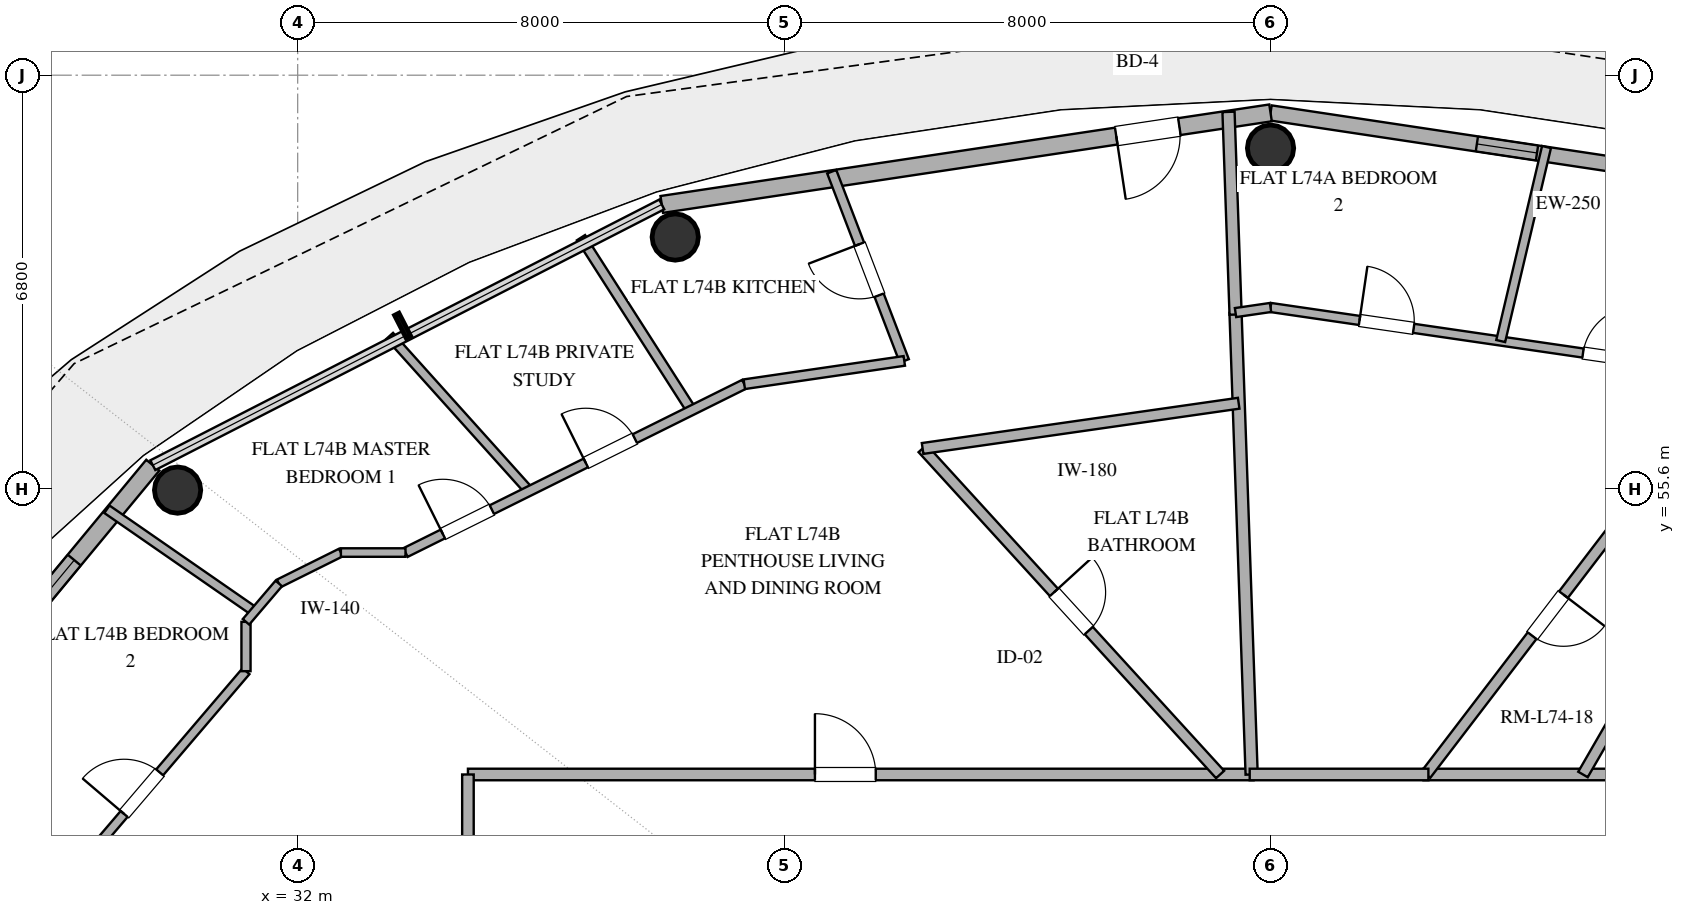
"""IFC4 building model, lengths in metres.
Left out: names, types, materials, properties, quantities, classifications, styles, units other than length and angle.
Written with IfcOpenShell. Run it as: python <this file> out.ifc"""

import sys

from ifc_helpers import new_model, si_unit, direction, frame, frame_2d, origin, origin_2d, place, context, subcontext, project, spatial, rectangle, hollow_circle, extrude, element, fill, save


model = new_model("IFC4")
c1 = context("Model", 3, precision=1e-05, world=origin(), true_north=direction((0.0, 1.0)))
c2 = subcontext(c1, "Body", "Model", "MODEL_VIEW")
j1 = project(units=[si_unit("LENGTHUNIT", "METRE"), si_unit("PLANEANGLEUNIT", "RADIAN")], contexts=[c1])
p1 = place(None, origin())
s1 = spatial("IfcSite", under=j1, at=p1, CompositionType="ELEMENT")
p2 = place(p1, origin())
s2 = spatial("IfcBuilding", under=s1, at=p2, CompositionType="ELEMENT")
p3 = place(p2, frame((0.0, 0.0, 287.4)))
s3 = spatial("IfcBuildingStorey", under=s2, at=p3, CompositionType="ELEMENT", Elevation=287.4)
for number, where, z_axis, x_axis in (
    (1, (48.0, 61.2, 0.0), (0.0, 0.0, 1.0), (1.0, 0.0, 0.0)),
    (2, (38.209, 59.739, 0.0), (0.0, 0.0, 1.0), (1.0, 0.0, 0.0)),
    (3, (30.025, 55.576, 0.0), (0.0, 0.0, 1.0), (1.0, 0.0, 0.0)),
):
    element("IfcColumn", number, at=place(p3, frame(where, z_axis=z_axis, x_axis=x_axis)), inside=s3, PredefinedType="COLUMN", context=c2, shape_type="SweptSolid", body=[
        extrude(hollow_circle(Radius=0.381, WallThickness=0.025, at=origin_2d()), origin(), (0.0, 0.0, 1.0), 3.37),
    ])
p4 = place(p3, frame((58.013, 60.274, 0.0), z_axis=(0.0, 0.0, 1.0), x_axis=(-0.988882522213, 0.148698881169, 0.0)))
e4 = element("IfcWall", 4, at=p4, inside=s3, PredefinedType="SOLIDWALL", context=c2, shape_type="SweptSolid", body=[
    extrude(rectangle(XDim=10.125, YDim=0.25, at=frame_2d((5.062, 0.0))), origin(), (0.0, 0.0, 1.0), 3.37),
])
p5 = place(p4, frame((2.134, 0.0, 1.42)))
e5 = element("IfcOpeningElement", 5, at=p5, cuts=e4, PredefinedType="OPENING", context=c2, shape_type="SweptSolid", body=[
    extrude(rectangle(XDim=1.0, YDim=1.05, at=frame_2d((0.5, 0.525))), frame((0.0, 0.135, 0.0), z_axis=(0.0, -1.0, 0.0), x_axis=(1.0, 0.0, 0.0)), (0.0, 0.0, 1.0), 0.27),
])
p6 = place(p4, frame((5.694, 0.0, 0.35)))
e6 = element("IfcOpeningElement", 6, at=p6, cuts=e4, PredefinedType="OPENING", context=c2, shape_type="SweptSolid", body=[
    extrude(rectangle(XDim=1.0, YDim=1.05, at=frame_2d((0.5, 0.525))), frame((0.0, 0.135, 0.0), z_axis=(0.0, -1.0, 0.0), x_axis=(1.0, 0.0, 0.0)), (0.0, 0.0, 1.0), 0.27),
])
p7 = place(p3, frame((48.0, 61.78, 0.0), z_axis=(0.0, 0.0, 1.0), x_axis=(-0.988882522213, -0.148698881169, 0.0)))
e7 = element("IfcWall", 7, at=p7, inside=s3, PredefinedType="SOLIDWALL", context=c2, shape_type="SweptSolid", body=[
    extrude(rectangle(XDim=10.125, YDim=0.28, at=frame_2d((5.062, 0.0))), origin(), (0.0, 0.0, 1.0), 3.37),
])
p8 = place(p7, frame((1.516, 0.0, 0.0)))
e8 = element("IfcOpeningElement", 8, at=p8, cuts=e7, PredefinedType="OPENING", context=c2, shape_type="SweptSolid", body=[
    extrude(rectangle(XDim=1.05, YDim=2.2, at=frame_2d((0.525, 1.1))), frame((0.0, 0.15, 0.0), z_axis=(0.0, -1.0, 0.0), x_axis=(1.0, 0.0, 0.0)), (0.0, 0.0, 1.0), 0.3),
])
p9 = place(p3, frame((29.617, 55.987, 0.0), z_axis=(0.0, 0.0, 1.0), x_axis=(-0.63761509934, -0.770355103243, 0.0)))
e9 = element("IfcWall", 9, at=p9, inside=s3, PredefinedType="SOLIDWALL", context=c2, shape_type="SweptSolid", body=[
    extrude(rectangle(XDim=8.33, YDim=0.28, at=frame_2d((4.165, 0.0))), origin(), (0.0, 0.0, 1.0), 3.37),
])
p10 = place(p9, frame((2.026, 0.0, 0.85)))
e10 = element("IfcOpeningElement", 10, at=p10, cuts=e9, PredefinedType="OPENING", context=c2, shape_type="SweptSolid", body=[
    extrude(rectangle(XDim=1.8, YDim=2.2, at=frame_2d((0.9, 1.1))), frame((0.0, 0.15, 0.0), z_axis=(0.0, -1.0, 0.0), x_axis=(1.0, 0.0, 0.0)), (0.0, 0.0, 1.0), 0.3),
])
p11 = place(p9, frame((4.396, 0.0, 0.85)))
e11 = element("IfcOpeningElement", 11, at=p11, cuts=e9, PredefinedType="OPENING", context=c2, shape_type="SweptSolid", body=[
    extrude(rectangle(XDim=1.8, YDim=2.2, at=frame_2d((0.9, 1.1))), frame((0.0, 0.15, 0.0), z_axis=(0.0, -1.0, 0.0), x_axis=(1.0, 0.0, 0.0)), (0.0, 0.0, 1.0), 0.3),
])
p12 = place(p3, frame((34.8, 50.9, 0.0), z_axis=(0.0, 0.0, 1.0), x_axis=(1.0, 0.0, 0.0)))
e12 = element("IfcWall", 12, at=p12, inside=s3, PredefinedType="PARTITIONING", context=c2, shape_type="SweptSolid", body=[
    extrude(rectangle(XDim=12.921, YDim=0.19, at=frame_2d((6.46, 0.0))), origin(), (0.0, 0.0, 1.0), 2.73),
])
p13 = place(p12, frame((5.707, 0.0, 0.0)))
e13 = element("IfcOpeningElement", 13, at=p13, cuts=e12, PredefinedType="OPENING", context=c2, shape_type="SweptSolid", body=[
    extrude(rectangle(XDim=1.0, YDim=2.2, at=frame_2d((0.5, 1.1))), frame((0.0, 0.105, 0.0), z_axis=(0.0, -1.0, 0.0), x_axis=(1.0, 0.0, 0.0)), (0.0, 0.0, 1.0), 0.21),
])
p14 = place(p3, frame((34.8, 34.0, 0.0), z_axis=(0.0, 0.0, 1.0), x_axis=(0.0, 1.0, 0.0)))
e14 = element("IfcWall", 14, at=p14, inside=s3, PredefinedType="PARTITIONING", context=c2, shape_type="SweptSolid", body=[
    extrude(rectangle(XDim=16.9, YDim=0.19, at=frame_2d((8.45, 0.0))), origin(), (0.0, 0.0, 1.0), 2.73),
])
p15 = place(p14, frame((7.627, 0.0, 0.0)))
e15 = element("IfcOpeningElement", 15, at=p15, cuts=e14, PredefinedType="OPENING", context=c2, shape_type="SweptSolid", body=[
    extrude(rectangle(XDim=1.0, YDim=2.2, at=frame_2d((0.5, 1.1))), frame((0.0, 0.105, 0.0), z_axis=(0.0, -1.0, 0.0), x_axis=(1.0, 0.0, 0.0)), (0.0, 0.0, 1.0), 0.21),
])
p16 = place(p3, frame((50.515, 50.9, 0.0), z_axis=(0.0, 0.0, 1.0), x_axis=(1.0, 0.0, 0.0)))
e16 = element("IfcWall", 16, at=p16, inside=s3, PredefinedType="PARTITIONING", context=c2, shape_type="SweptSolid", body=[
    extrude(rectangle(XDim=10.685, YDim=0.19, at=frame_2d((5.342, 0.0))), origin(), (0.0, 0.0, 1.0), 2.73),
])
p17 = place(p16, frame((6.135, 0.0, 0.0)))
e17 = element("IfcOpeningElement", 17, at=p17, cuts=e16, PredefinedType="OPENING", context=c2, shape_type="SweptSolid", body=[
    extrude(rectangle(XDim=1.0, YDim=2.2, at=frame_2d((0.5, 1.1))), frame((0.0, 0.105, 0.0), z_axis=(0.0, -1.0, 0.0), x_axis=(1.0, 0.0, 0.0)), (0.0, 0.0, 1.0), 0.21),
])
p18 = place(p3, frame((42.278, 56.261, 0.0), z_axis=(0.0, 0.0, 1.0), x_axis=(0.674096276867, -0.73864349284, 0.0)))
e18 = element("IfcWall", 18, at=p18, inside=s3, PredefinedType="PLUMBINGWALL", context=c2, shape_type="SweptSolid", body=[
    extrude(rectangle(XDim=7.258, YDim=0.18, at=frame_2d((3.629, 0.0))), origin(), (0.0, 0.0, 1.0), 2.73),
])
p19 = place(p18, frame((3.204, 0.0, 0.0)))
e19 = element("IfcOpeningElement", 19, at=p19, cuts=e18, PredefinedType="OPENING", context=c2, shape_type="SweptSolid", body=[
    extrude(rectangle(XDim=0.85, YDim=2.1, at=frame_2d((0.425, 1.05))), frame((0.0, 0.1, 0.0), z_axis=(0.0, -1.0, 0.0), x_axis=(1.0, 0.0, 0.0)), (0.0, 0.0, 1.0), 0.2),
])
p20 = place(p3, frame((54.564, 56.141, 0.0), z_axis=(0.0, 0.0, 1.0), x_axis=(-0.607456974677, -0.794352581614, 0.0)))
e20 = element("IfcWall", 20, at=p20, inside=s3, PredefinedType="PLUMBINGWALL", context=c2, shape_type="SweptSolid", body=[
    extrude(rectangle(XDim=6.598, YDim=0.18, at=frame_2d((3.299, 0.0))), origin(), (0.0, 0.0, 1.0), 2.73),
])
p21 = place(p20, frame((2.874, 0.0, 0.0)))
e21 = element("IfcOpeningElement", 21, at=p21, cuts=e20, PredefinedType="OPENING", context=c2, shape_type="SweptSolid", body=[
    extrude(rectangle(XDim=0.85, YDim=2.1, at=frame_2d((0.425, 1.05))), frame((0.0, 0.1, 0.0), z_axis=(0.0, -1.0, 0.0), x_axis=(1.0, 0.0, 0.0)), (0.0, 0.0, 1.0), 0.2),
])
p22 = place(p3, frame((47.689, 50.9, 0.0), z_axis=(0.0, 0.0, 1.0), x_axis=(-0.034882659784, 0.999391414835, 0.0)))
e22 = element("IfcWall", 22, at=p22, inside=s3, PredefinedType="PARTITIONING", context=c2, shape_type="SweptSolid", body=[
    extrude(rectangle(XDim=7.601, YDim=0.2, at=frame_2d((3.8, 0.0))), origin(), (0.0, 0.0, 1.0), 2.73),
])
p23 = place(p3, frame((53.138, 50.9, 0.0), z_axis=(0.0, 0.0, 1.0), x_axis=(0.499985927882, 0.866033528173, 0.0)))
e23 = element("IfcWall", 23, at=p23, inside=s3, PredefinedType="PLUMBINGWALL", context=c2, shape_type="SweptSolid", body=[
    extrude(rectangle(XDim=5.802, YDim=0.18, at=frame_2d((2.901, 0.0))), origin(), (0.0, 0.0, 1.0), 2.73),
])
p24 = place(p3, frame((27.726, 48.587, 0.0), z_axis=(0.0, 0.0, 1.0), x_axis=(0.649196412447, 0.760620810961, 0.0)))
e24 = element("IfcWall", 24, at=p24, inside=s3, PredefinedType="PARTITIONING", context=c2, shape_type="SweptSolid", body=[
    extrude(rectangle(XDim=5.274, YDim=0.15, at=frame_2d((2.637, 0.0))), origin(), (0.0, 0.0, 1.0), 2.73),
])
p25 = place(p24, frame((2.187, 0.0, 0.0)))
e25 = element("IfcOpeningElement", 25, at=p25, cuts=e24, PredefinedType="OPENING", context=c2, shape_type="SweptSolid", body=[
    extrude(rectangle(XDim=0.9, YDim=2.1, at=frame_2d((0.45, 1.05))), frame((0.0, 0.085, 0.0), z_axis=(0.0, -1.0, 0.0), x_axis=(1.0, 0.0, 0.0)), (0.0, 0.0, 1.0), 0.17),
])
p26 = place(p3, frame((47.476, 57.005, 0.0), z_axis=(0.0, 0.0, 1.0), x_axis=(-0.989922511169, -0.141610105153, 0.0)))
e26 = element("IfcWall", 26, at=p26, inside=s3, PredefinedType="PLUMBINGWALL", context=c2, shape_type="SweptSolid", body=[
    extrude(rectangle(XDim=5.251, YDim=0.18, at=frame_2d((2.626, 0.0))), origin(), (0.0, 0.0, 1.0), 2.73),
])
p27 = place(p3, frame((48.0, 58.58, 0.0), z_axis=(0.0, 0.0, 1.0), x_axis=(0.989536136377, -0.144285254977, 0.0)))
e27 = element("IfcWall", 27, at=p27, inside=s3, PredefinedType="PARTITIONING", context=c2, shape_type="SweptSolid", body=[
    extrude(rectangle(XDim=8.746, YDim=0.15, at=frame_2d((4.373, 0.0))), origin(), (0.0, 0.0, 1.0), 2.73),
])
p28 = place(p27, frame((1.479, 0.0, 0.0)))
e28 = element("IfcOpeningElement", 28, at=p28, cuts=e27, PredefinedType="OPENING", context=c2, shape_type="SweptSolid", body=[
    extrude(rectangle(XDim=0.9, YDim=2.1, at=frame_2d((0.45, 1.05))), frame((0.0, 0.085, 0.0), z_axis=(0.0, -1.0, 0.0), x_axis=(1.0, 0.0, 0.0)), (0.0, 0.0, 1.0), 0.17),
])
p29 = place(p27, frame((5.193, 0.0, 0.0)))
e29 = element("IfcOpeningElement", 29, at=p29, cuts=e27, PredefinedType="OPENING", context=c2, shape_type="SweptSolid", body=[
    extrude(rectangle(XDim=0.9, YDim=2.1, at=frame_2d((0.45, 1.05))), frame((0.0, 0.085, 0.0), z_axis=(0.0, -1.0, 0.0), x_axis=(1.0, 0.0, 0.0)), (0.0, 0.0, 1.0), 0.17),
])
p30 = place(p3, frame((35.807, 55.561, 0.0), z_axis=(0.0, 0.0, 1.0), x_axis=(-0.668618761853, 0.743605373365, 0.0)))
e30 = element("IfcWall", 30, at=p30, inside=s3, PredefinedType="PARTITIONING", context=c2, shape_type="SweptSolid", body=[
    extrude(rectangle(XDim=3.432, YDim=0.15, at=frame_2d((1.716, 0.0))), origin(), (0.0, 0.0, 1.0), 2.73),
])
p31 = place(p3, frame((38.477, 56.887, 0.0), z_axis=(0.0, 0.0, 1.0), x_axis=(-0.538850350107, 0.842401507709, 0.0)))
e31 = element("IfcWall", 31, at=p31, inside=s3, PredefinedType="PLUMBINGWALL", context=c2, shape_type="SweptSolid", body=[
    extrude(rectangle(XDim=3.373, YDim=0.16, at=frame_2d((1.687, 0.0))), origin(), (0.0, 0.0, 1.0), 2.73),
])
p32 = place(p3, frame((47.309, 61.797, 0.0), z_axis=(0.0, 0.0, 1.0), x_axis=(0.034921182562, -0.999390069497, 0.0)))
e32 = element("IfcWall", 32, at=p32, inside=s3, PredefinedType="PARTITIONING", context=c2, shape_type="SweptSolid", body=[
    extrude(rectangle(XDim=3.335, YDim=0.2, at=frame_2d((1.667, 0.0))), origin(), (0.0, 0.0, 1.0), 2.73),
])
p33 = place(p3, frame((41.977, 57.702, 0.0), z_axis=(0.0, 0.0, 1.0), x_axis=(-0.358154229758, 0.933662437772, 0.0)))
e33 = element("IfcWall", 33, at=p33, inside=s3, PredefinedType="PLUMBINGWALL", context=c2, shape_type="SweptSolid", body=[
    extrude(rectangle(XDim=3.333, YDim=0.16, at=frame_2d((1.667, 0.0))), origin(), (0.0, 0.0, 1.0), 2.73),
])
p34 = place(p33, frame((1.156, 0.0, 0.0)))
e34 = element("IfcOpeningElement", 34, at=p34, cuts=e33, PredefinedType="OPENING", context=c2, shape_type="SweptSolid", body=[
    extrude(rectangle(XDim=0.9, YDim=2.1, at=frame_2d((0.45, 1.05))), frame((0.0, 0.09, 0.0), z_axis=(0.0, -1.0, 0.0), x_axis=(1.0, 0.0, 0.0)), (0.0, 0.0, 1.0), 0.18),
])
p35 = place(p3, frame((51.785, 58.028, 0.0), z_axis=(0.0, 0.0, 1.0), x_axis=(0.2298279545, 0.973231273301, 0.0)))
e35 = element("IfcWall", 35, at=p35, inside=s3, PredefinedType="PARTITIONING", context=c2, shape_type="SweptSolid", body=[
    extrude(rectangle(XDim=3.278, YDim=0.15, at=frame_2d((1.639, 0.0))), origin(), (0.0, 0.0, 1.0), 2.73),
])
p36 = place(p3, frame((33.773, 54.55, 0.0), z_axis=(0.0, 0.0, 1.0), x_axis=(0.895562239868, 0.444936258943, 0.0)))
e36 = element("IfcWall", 36, at=p36, inside=s3, PredefinedType="PLUMBINGWALL", context=c2, shape_type="SweptSolid", body=[
    extrude(rectangle(XDim=6.222, YDim=0.16, at=frame_2d((3.111, 0.0))), origin(), (0.0, 0.0, 1.0), 2.73),
])
p37 = place(p36, frame((3.311, 0.0, 0.0)))
e37 = element("IfcOpeningElement", 37, at=p37, cuts=e36, PredefinedType="OPENING", context=c2, shape_type="SweptSolid", body=[
    extrude(rectangle(XDim=0.9, YDim=2.1, at=frame_2d((0.45, 1.05))), frame((0.0, 0.09, 0.0), z_axis=(0.0, -1.0, 0.0), x_axis=(1.0, 0.0, 0.0)), (0.0, 0.0, 1.0), 0.18),
])
p38 = place(p36, frame((0.686, 0.0, 0.0)))
e38 = element("IfcOpeningElement", 38, at=p38, cuts=e36, PredefinedType="OPENING", context=c2, shape_type="SweptSolid", body=[
    extrude(rectangle(XDim=0.9, YDim=2.1, at=frame_2d((0.45, 1.05))), frame((0.0, 0.09, 0.0), z_axis=(0.0, -1.0, 0.0), x_axis=(1.0, 0.0, 0.0)), (0.0, 0.0, 1.0), 0.18),
])
p39 = place(p3, frame((31.293, 53.578, 0.0), z_axis=(0.0, 0.0, 1.0), x_axis=(-0.821957300328, 0.569549116792, 0.0)))
e39 = element("IfcWall", 39, at=p39, inside=s3, PredefinedType="PARTITIONING", context=c2, shape_type="SweptSolid", body=[
    extrude(rectangle(XDim=2.957, YDim=0.15, at=frame_2d((1.479, 0.0))), origin(), (0.0, 0.0, 1.0), 2.73),
])
p40 = place(p3, frame((47.657, 50.9, 0.0), z_axis=(0.0, 0.0, 1.0), x_axis=(1.0, 0.0, 0.0)))
e40 = element("IfcWall", 40, at=p40, inside=s3, PredefinedType="PARTITIONING", context=c2, shape_type="SweptSolid", body=[
    extrude(rectangle(XDim=2.939, YDim=0.19, at=frame_2d((1.469, 0.0))), origin(), (0.0, 0.0, 1.0), 2.73),
])
p41 = place(p3, frame((39.345, 57.318, 0.0), z_axis=(0.0, 0.0, 1.0), x_axis=(0.989530249601, 0.144325621857, 0.0)))
e41 = element("IfcWall", 41, at=p41, inside=s3, PredefinedType="PLUMBINGWALL", context=c2, shape_type="SweptSolid", body=[
    extrude(rectangle(XDim=2.659, YDim=0.16, at=frame_2d((1.33, 0.0))), origin(), (0.0, 0.0, 1.0), 2.73),
])
p42 = place(p3, frame((32.711, 54.55, 0.0), z_axis=(0.0, 0.0, 1.0), x_axis=(-0.895409226325, -0.445244109912, 0.0)))
e42 = element("IfcWall", 42, at=p42, inside=s3, PredefinedType="PARTITIONING", context=c2, shape_type="SweptSolid", body=[
    extrude(rectangle(XDim=1.141, YDim=0.14, at=frame_2d((0.571, 0.0))), origin(), (0.0, 0.0, 1.0), 2.73),
])
p43 = place(p3, frame((33.773, 54.55, 0.0), z_axis=(0.0, 0.0, 1.0), x_axis=(-1.0, 0.0, 0.0)))
e43 = element("IfcWall", 43, at=p43, inside=s3, PredefinedType="PARTITIONING", context=c2, shape_type="SweptSolid", body=[
    extrude(rectangle(XDim=1.062, YDim=0.14, at=frame_2d((0.531, 0.0))), origin(), (0.0, 0.0, 1.0), 2.73),
])
p44 = place(p3, frame((31.15, 52.599, 0.0), z_axis=(0.0, 0.0, 1.0), x_axis=(0.0, 1.0, 0.0)))
e44 = element("IfcWall", 44, at=p44, inside=s3, PredefinedType="PARTITIONING", context=c2, shape_type="SweptSolid", body=[
    extrude(rectangle(XDim=0.812, YDim=0.15, at=frame_2d((0.406, 0.0))), origin(), (0.0, 0.0, 1.0), 2.73),
])
p45 = place(p3, frame((31.689, 54.042, 0.0), z_axis=(0.0, 0.0, 1.0), x_axis=(-0.649191857323, -0.760624698774, 0.0)))
e45 = element("IfcWall", 45, at=p45, inside=s3, PredefinedType="PARTITIONING", context=c2, shape_type="SweptSolid", body=[
    extrude(rectangle(XDim=0.83, YDim=0.14, at=frame_2d((0.415, 0.0))), origin(), (0.0, 0.0, 1.0), 2.73),
])
p46 = place(p3, frame((47.424, 58.496, 0.0), z_axis=(0.0, 0.0, 1.0), x_axis=(0.989534228924, 0.144298336053, 0.0)))
e46 = element("IfcWall", 46, at=p46, inside=s3, PredefinedType="PARTITIONING", context=c2, shape_type="SweptSolid", body=[
    extrude(rectangle(XDim=0.582, YDim=0.15, at=frame_2d((0.291, 0.0))), origin(), (0.0, 0.0, 1.0), 2.73),
])
p47 = place(p8, origin())
e47 = element("IfcDoor", 47, at=p47, inside=s3, OperationType="SINGLE_SWING_RIGHT", PredefinedType="DOOR", context=c2, shape_type="SweptSolid", body=[
    extrude(rectangle(XDim=1.05, YDim=2.2, at=frame_2d((0.525, 1.1))), frame((0.0, 0.025, 0.0), z_axis=(0.0, -1.0, 0.0), x_axis=(1.0, 0.0, 0.0)), (0.0, 0.0, 1.0), 0.05),
])
fill(e8, e47)
p48 = place(p10, origin())
e48 = element("IfcWindow", 48, at=p48, inside=s3, PartitioningType="SINGLE_PANEL", PredefinedType="WINDOW", context=c2, shape_type="SweptSolid", body=[
    extrude(rectangle(XDim=1.8, YDim=2.2, at=frame_2d((0.9, 1.1))), frame((0.0, 0.03, 0.0), z_axis=(0.0, -1.0, 0.0), x_axis=(1.0, 0.0, 0.0)), (0.0, 0.0, 1.0), 0.06),
])
fill(e10, e48)
p49 = place(p6, origin())
e49 = element("IfcWindow", 49, at=p49, inside=s3, PartitioningType="SINGLE_PANEL", PredefinedType="WINDOW", context=c2, shape_type="SweptSolid", body=[
    extrude(rectangle(XDim=1.0, YDim=1.05, at=frame_2d((0.5, 0.525))), frame((0.0, 0.03, 0.0), z_axis=(0.0, -1.0, 0.0), x_axis=(1.0, 0.0, 0.0)), (0.0, 0.0, 1.0), 0.06),
])
fill(e6, e49)
p50 = place(p13, origin())
e50 = element("IfcDoor", 50, at=p50, inside=s3, OperationType="SINGLE_SWING_LEFT", PredefinedType="DOOR", context=c2, shape_type="SweptSolid", body=[
    extrude(rectangle(XDim=1.0, YDim=2.2, at=frame_2d((0.5, 1.1))), frame((0.0, 0.025, 0.0), z_axis=(0.0, -1.0, 0.0), x_axis=(1.0, 0.0, 0.0)), (0.0, 0.0, 1.0), 0.05),
])
fill(e13, e50)
p51 = place(p19, origin())
e51 = element("IfcDoor", 51, at=p51, inside=s3, OperationType="SINGLE_SWING_LEFT", PredefinedType="DOOR", context=c2, shape_type="SweptSolid", body=[
    extrude(rectangle(XDim=0.85, YDim=2.1, at=frame_2d((0.425, 1.05))), frame((0.0, 0.025, 0.0), z_axis=(0.0, -1.0, 0.0), x_axis=(1.0, 0.0, 0.0)), (0.0, 0.0, 1.0), 0.05),
])
fill(e19, e51)
p52 = place(p21, origin())
e52 = element("IfcDoor", 52, at=p52, inside=s3, OperationType="SINGLE_SWING_LEFT", PredefinedType="DOOR", context=c2, shape_type="SweptSolid", body=[
    extrude(rectangle(XDim=0.85, YDim=2.1, at=frame_2d((0.425, 1.05))), frame((0.0, 0.025, 0.0), z_axis=(0.0, -1.0, 0.0), x_axis=(1.0, 0.0, 0.0)), (0.0, 0.0, 1.0), 0.05),
])
fill(e21, e52)
p53 = place(p25, origin())
e53 = element("IfcDoor", 53, at=p53, inside=s3, OperationType="SINGLE_SWING_LEFT", PredefinedType="DOOR", context=c2, shape_type="SweptSolid", body=[
    extrude(rectangle(XDim=0.9, YDim=2.1, at=frame_2d((0.45, 1.05))), frame((0.0, 0.025, 0.0), z_axis=(0.0, -1.0, 0.0), x_axis=(1.0, 0.0, 0.0)), (0.0, 0.0, 1.0), 0.05),
])
fill(e25, e53)
p54 = place(p28, origin())
e54 = element("IfcDoor", 54, at=p54, inside=s3, OperationType="SINGLE_SWING_LEFT", PredefinedType="DOOR", context=c2, shape_type="SweptSolid", body=[
    extrude(rectangle(XDim=0.9, YDim=2.1, at=frame_2d((0.45, 1.05))), frame((0.0, 0.025, 0.0), z_axis=(0.0, -1.0, 0.0), x_axis=(1.0, 0.0, 0.0)), (0.0, 0.0, 1.0), 0.05),
])
fill(e28, e54)
p55 = place(p29, origin())
e55 = element("IfcDoor", 55, at=p55, inside=s3, OperationType="SINGLE_SWING_RIGHT", PredefinedType="DOOR", context=c2, shape_type="SweptSolid", body=[
    extrude(rectangle(XDim=0.9, YDim=2.1, at=frame_2d((0.45, 1.05))), frame((0.0, 0.025, 0.0), z_axis=(0.0, -1.0, 0.0), x_axis=(1.0, 0.0, 0.0)), (0.0, 0.0, 1.0), 0.05),
])
fill(e29, e55)
p56 = place(p34, origin())
e56 = element("IfcDoor", 56, at=p56, inside=s3, OperationType="SINGLE_SWING_RIGHT", PredefinedType="DOOR", context=c2, shape_type="SweptSolid", body=[
    extrude(rectangle(XDim=0.9, YDim=2.1, at=frame_2d((0.45, 1.05))), frame((0.0, 0.025, 0.0), z_axis=(0.0, -1.0, 0.0), x_axis=(1.0, 0.0, 0.0)), (0.0, 0.0, 1.0), 0.05),
])
fill(e34, e56)
p57 = place(p37, origin())
e57 = element("IfcDoor", 57, at=p57, inside=s3, OperationType="SINGLE_SWING_LEFT", PredefinedType="DOOR", context=c2, shape_type="SweptSolid", body=[
    extrude(rectangle(XDim=0.9, YDim=2.1, at=frame_2d((0.45, 1.05))), frame((0.0, 0.025, 0.0), z_axis=(0.0, -1.0, 0.0), x_axis=(1.0, 0.0, 0.0)), (0.0, 0.0, 1.0), 0.05),
])
fill(e37, e57)
p58 = place(p38, origin())
e58 = element("IfcDoor", 58, at=p58, inside=s3, OperationType="SINGLE_SWING_LEFT", PredefinedType="DOOR", context=c2, shape_type="SweptSolid", body=[
    extrude(rectangle(XDim=0.9, YDim=2.1, at=frame_2d((0.45, 1.05))), frame((0.0, 0.025, 0.0), z_axis=(0.0, -1.0, 0.0), x_axis=(1.0, 0.0, 0.0)), (0.0, 0.0, 1.0), 0.05),
])
fill(e38, e58)
save(model, sys.argv[1])
